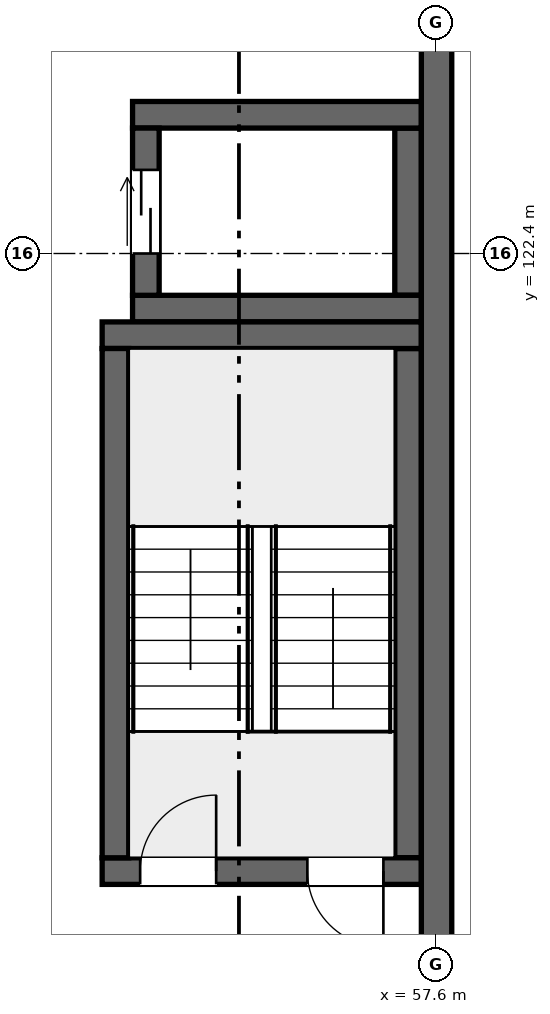
"""IFC4 building model, lengths in metres.
Left out: names, types, materials, properties, quantities, classifications, styles, units other than length and angle.
Written with IfcOpenShell. Run it as: python <this file> out.ifc"""

import sys

from ifc_helpers import new_model, si_unit, direction, frame, frame_2d, origin, place, context, subcontext, project, spatial, rectangle, extrude, element, fill, save


model = new_model("IFC4")
c1 = context("Model", 3, precision=1e-05, world=origin(), true_north=direction((0.0, 1.0)))
c2 = subcontext(c1, "Body", "Model", "MODEL_VIEW")
j1 = project(units=[si_unit("LENGTHUNIT", "METRE"), si_unit("PLANEANGLEUNIT", "RADIAN")], contexts=[c1])
p1 = place(None, origin())
s1 = spatial("IfcSite", under=j1, at=p1, CompositionType="ELEMENT")
p2 = place(p1, origin())
s2 = spatial("IfcBuilding", under=s1, at=p2, CompositionType="ELEMENT")
p3 = place(p2, frame((0.0, 0.0, 26.7)))
s3 = spatial("IfcBuildingStorey", under=s2, at=p3, CompositionType="ELEMENT", Elevation=26.7)
p4 = place(p3, frame((57.6, 94.12, 0.0), z_axis=(0.0, 0.0, 1.0), x_axis=(0.0, 1.0, 0.0)))
e1 = element("IfcWall", 1, at=p4, inside=s3, PredefinedType="SHEAR", context=c2, shape_type="SweptSolid", body=[
    extrude(rectangle(XDim=46.88, YDim=0.4, at=frame_2d((23.44, 0.0))), origin(), (0.0, 0.0, 1.0), 5.2),
])
p5 = place(p3, frame((53.2, 114.275, 0.0), z_axis=(0.0, 0.0, 1.0), x_axis=(1.0, 0.0, 0.0)))
e2 = element("IfcWall", 2, at=p5, inside=s3, PredefinedType="SHEAR", context=c2, shape_type="SweptSolid", body=[
    extrude(rectangle(XDim=4.2, YDim=0.35, at=frame_2d((2.1, 0.0))), origin(), (0.0, 0.0, 1.0), 5.2),
])
p6 = place(p5, frame((0.5, 0.0, 0.0)))
e3 = element("IfcOpeningElement", 3, at=p6, cuts=e2, PredefinedType="OPENING", context=c2, shape_type="SweptSolid", body=[
    extrude(rectangle(XDim=1.0, YDim=2.1, at=frame_2d((0.5, 1.05))), frame((0.0, 0.185, 0.0), z_axis=(0.0, -1.0, 0.0), x_axis=(1.0, 0.0, 0.0)), (0.0, 0.0, 1.0), 0.37),
])
p7 = place(p5, frame((2.7, 0.0, 0.0)))
e4 = element("IfcOpeningElement", 4, at=p7, cuts=e2, PredefinedType="OPENING", context=c2, shape_type="SweptSolid", body=[
    extrude(rectangle(XDim=1.0, YDim=2.1, at=frame_2d((0.5, 1.05))), frame((0.0, 0.185, 0.0), z_axis=(0.0, -1.0, 0.0), x_axis=(1.0, 0.0, 0.0)), (0.0, 0.0, 1.0), 0.37),
])
p8 = place(p3, frame((53.2, 121.325, 0.0), z_axis=(0.0, 0.0, 1.0), x_axis=(1.0, 0.0, 0.0)))
e5 = element("IfcWall", 5, at=p8, inside=s3, PredefinedType="SHEAR", context=c2, shape_type="SweptSolid", body=[
    extrude(rectangle(XDim=4.2, YDim=0.35, at=frame_2d((2.1, 0.0))), origin(), (0.0, 0.0, 1.0), 5.2),
])
for number, where, z_axis, x_axis in (
    (6, (53.375, 114.45, 0.0), (0.0, 0.0, 1.0), (0.0, 1.0, 0.0)),
    (7, (57.225, 114.45, 0.0), (0.0, 0.0, 1.0), (0.0, 1.0, 0.0)),
):
    element("IfcWall", number, at=place(p3, frame(where, z_axis=z_axis, x_axis=x_axis)), inside=s3, PredefinedType="SHEAR", context=c2, shape_type="SweptSolid", body=[
        extrude(rectangle(XDim=6.7, YDim=0.35, at=frame_2d((3.35, 0.0))), origin(), (0.0, 0.0, 1.0), 5.2),
    ])
for number, where, z_axis, x_axis in (
    (8, (53.6, 121.675, 0.0), (0.0, 0.0, 1.0), (1.0, 0.0, 0.0)),
    (9, (53.6, 124.225, 0.0), (0.0, 0.0, 1.0), (1.0, 0.0, 0.0)),
):
    element("IfcWall", number, at=place(p3, frame(where, z_axis=z_axis, x_axis=x_axis)), inside=s3, PredefinedType="SHEAR", context=c2, shape_type="SweptSolid", body=[
        extrude(rectangle(XDim=3.8, YDim=0.35, at=frame_2d((1.9, 0.0))), origin(), (0.0, 0.0, 1.0), 5.2),
    ])
p9 = place(p3, frame((53.775, 121.85, 0.0), z_axis=(0.0, 0.0, 1.0), x_axis=(0.0, 1.0, 0.0)))
e10 = element("IfcWall", 10, at=p9, inside=s3, PredefinedType="SHEAR", context=c2, shape_type="SweptSolid", body=[
    extrude(rectangle(XDim=2.2, YDim=0.35, at=frame_2d((1.1, 0.0))), origin(), (0.0, 0.0, 1.0), 5.2),
])
p10 = place(p9, frame((0.55, 0.0, 0.0)))
e11 = element("IfcOpeningElement", 11, at=p10, cuts=e10, PredefinedType="OPENING", context=c2, shape_type="SweptSolid", body=[
    extrude(rectangle(XDim=1.1, YDim=2.1, at=frame_2d((0.55, 1.05))), frame((0.0, 0.185, 0.0), z_axis=(0.0, -1.0, 0.0), x_axis=(1.0, 0.0, 0.0)), (0.0, 0.0, 1.0), 0.37),
])
p11 = place(p3, frame((57.225, 121.85, 0.0), z_axis=(0.0, 0.0, 1.0), x_axis=(0.0, 1.0, 0.0)))
e12 = element("IfcWall", 12, at=p11, inside=s3, PredefinedType="SHEAR", context=c2, shape_type="SweptSolid", body=[
    extrude(rectangle(XDim=2.2, YDim=0.35, at=frame_2d((1.1, 0.0))), origin(), (0.0, 0.0, 1.0), 5.2),
])
p12 = place(p6, origin())
e13 = element("IfcDoor", 13, at=p12, inside=s3, OperationType="SINGLE_SWING_RIGHT", PredefinedType="DOOR", context=c2, shape_type="SweptSolid", body=[
    extrude(rectangle(XDim=1.0, YDim=2.1, at=frame_2d((0.5, 1.05))), frame((0.0, 0.025, 0.0), z_axis=(0.0, -1.0, 0.0), x_axis=(1.0, 0.0, 0.0)), (0.0, 0.0, 1.0), 0.05),
])
fill(e3, e13)
p13 = place(p7, origin())
e14 = element("IfcDoor", 14, at=p13, inside=s3, OperationType="SINGLE_SWING_LEFT", PredefinedType="DOOR", context=c2, shape_type="SweptSolid", body=[
    extrude(rectangle(XDim=1.0, YDim=2.1, at=frame_2d((0.5, 1.05))), frame((0.0, 0.025, 0.0), z_axis=(0.0, -1.0, 0.0), x_axis=(1.0, 0.0, 0.0)), (0.0, 0.0, 1.0), 0.05),
])
fill(e4, e14)
p14 = place(p10, origin())
e15 = element("IfcDoor", 15, at=p14, inside=s3, OperationType="DOUBLE_DOOR_SLIDING", PredefinedType="DOOR", context=c2, shape_type="SweptSolid", body=[
    extrude(rectangle(XDim=1.1, YDim=2.1, at=frame_2d((0.55, 1.05))), frame((0.0, 0.025, 0.0), z_axis=(0.0, -1.0, 0.0), x_axis=(1.0, 0.0, 0.0)), (0.0, 0.0, 1.0), 0.05),
])
fill(e11, e15)
save(model, sys.argv[1])
